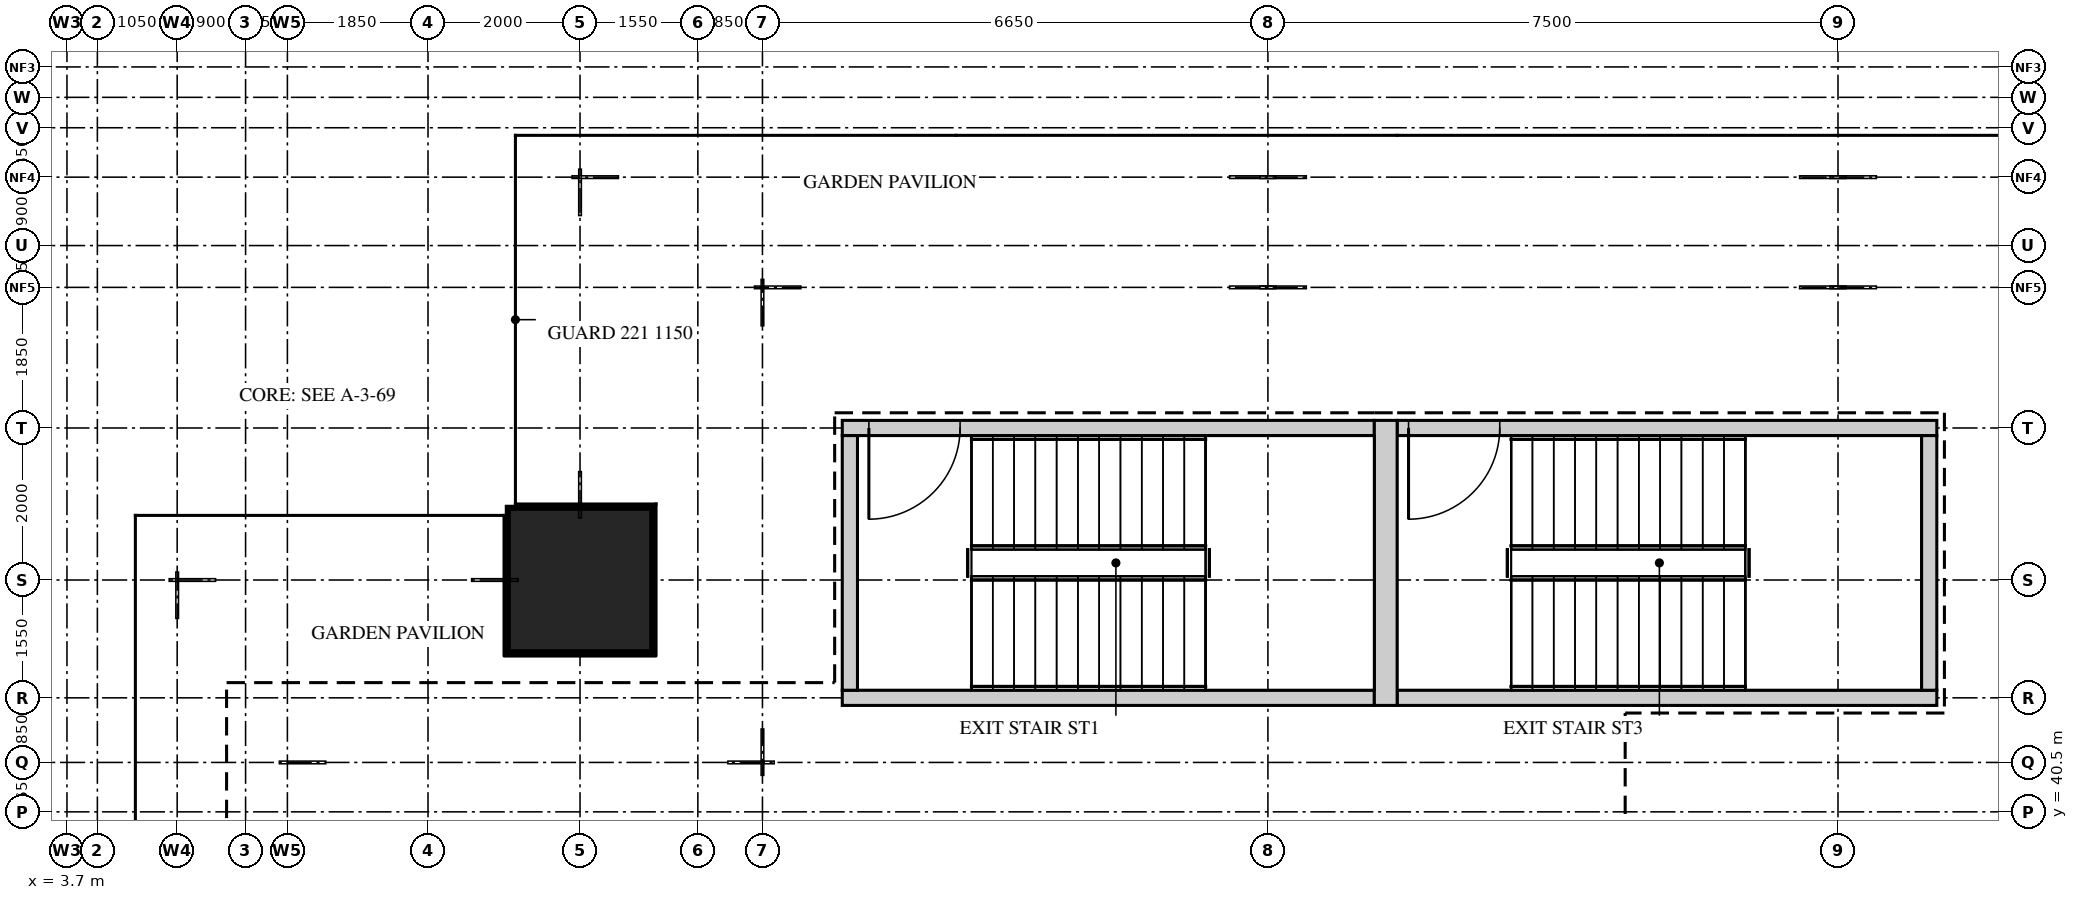
"""IFC4 building model, lengths in metres.
Left out: names, types, materials, properties, quantities, classifications, styles, units other than length and angle.
Written with IfcOpenShell. Run it as: python <this file> out.ifc"""

import sys

from ifc_helpers import new_model, si_unit, direction, frame, frame_2d, origin, origin_2d, place, context, subcontext, project, spatial, rectangle, extrude, source, transform, mapped, element, fill, save


model = new_model("IFC4")
c1 = context("Model", 3, precision=1e-05, world=origin(), true_north=direction((0.0, 1.0)))
c2 = subcontext(c1, "Body", "Model", "MODEL_VIEW")
j1 = project(units=[si_unit("LENGTHUNIT", "METRE"), si_unit("PLANEANGLEUNIT", "RADIAN")], contexts=[c1])
p1 = place(None, origin())
s1 = spatial("IfcSite", under=j1, at=p1, CompositionType="ELEMENT")
p2 = place(p1, origin())
s2 = spatial("IfcBuilding", under=s1, at=p2, CompositionType="ELEMENT")
p3 = place(p2, frame((0.0, 0.0, 274.2)))
s3 = spatial("IfcBuildingStorey", under=s2, at=p3, CompositionType="ELEMENT", Elevation=274.2)
m1 = source(origin(), c2, "Body", "SweptSolid", [
    extrude(rectangle(XDim=7.0, YDim=0.2, at=frame_2d((3.5, 0.0))), origin(), (0.0, 0.0, 1.0), 7.75),
])
p4 = place(p3, frame((13.9, 45.55, 0.0), z_axis=(0.0, 0.0, 1.0), x_axis=(1.0, 0.0, 0.0)))
e1 = element("IfcWall", 1, at=p4, inside=s3, PredefinedType="SHEAR", context=c2, shape_type="MappedRepresentation", body=[
    mapped(m1, transform((0.0, 0.0, 0.0))),
])
m2 = source(origin(), c2, "Body", "SweptSolid", [
    extrude(rectangle(XDim=1.2, YDim=2.1, at=frame_2d((0.6, 1.05))), frame((0.0, 0.11, 0.0), z_axis=(0.0, -1.0, 0.0), x_axis=(1.0, 0.0, 0.0)), (0.0, 0.0, 1.0), 0.22),
])
p5 = place(p4, frame((0.35, 0.0, 0.0)))
e2 = element("IfcOpeningElement", 2, at=p5, cuts=e1, PredefinedType="OPENING", context=c2, shape_type="MappedRepresentation", body=[
    mapped(m2, transform((0.0, 0.0, 0.0))),
])
p6 = place(p3, frame((13.9, 42.0, 0.0), z_axis=(0.0, 0.0, 1.0), x_axis=(1.0, 0.0, 0.0)))
e3 = element("IfcWall", 3, at=p6, inside=s3, PredefinedType="SHEAR", context=c2, shape_type="MappedRepresentation", body=[
    mapped(m1, transform((0.0, 0.0, 0.0))),
])
m3 = source(origin(), c2, "Body", "SweptSolid", [
    extrude(rectangle(XDim=7.1, YDim=0.2, at=frame_2d((3.55, 0.0))), origin(), (0.0, 0.0, 1.0), 7.75),
])
p7 = place(p3, frame((21.2, 45.55, 0.0), z_axis=(0.0, 0.0, 1.0), x_axis=(1.0, 0.0, 0.0)))
e4 = element("IfcWall", 4, at=p7, inside=s3, PredefinedType="SHEAR", context=c2, shape_type="MappedRepresentation", body=[
    mapped(m3, transform((0.0, 0.0, 0.0))),
])
p8 = place(p7, frame((0.15, 0.0, 0.0)))
e5 = element("IfcOpeningElement", 5, at=p8, cuts=e4, PredefinedType="OPENING", context=c2, shape_type="MappedRepresentation", body=[
    mapped(m2, transform((0.0, 0.0, 0.0))),
])
p9 = place(p3, frame((21.2, 42.0, 0.0), z_axis=(0.0, 0.0, 1.0), x_axis=(1.0, 0.0, 0.0)))
e6 = element("IfcWall", 6, at=p9, inside=s3, PredefinedType="SHEAR", context=c2, shape_type="MappedRepresentation", body=[
    mapped(m3, transform((0.0, 0.0, 0.0))),
])
m4 = source(origin(), c2, "Body", "SweptSolid", [
    extrude(rectangle(XDim=3.75, YDim=0.3, at=frame_2d((1.875, 0.0))), origin(), (0.0, 0.0, 1.0), 7.75),
])
p10 = place(p3, frame((21.05, 41.9, 0.0), z_axis=(0.0, 0.0, 1.0), x_axis=(0.0, 1.0, 0.0)))
e7 = element("IfcWall", 7, at=p10, inside=s3, PredefinedType="SHEAR", context=c2, shape_type="MappedRepresentation", body=[
    mapped(m4, transform((0.0, 0.0, 0.0))),
])
m5 = source(origin(), c2, "Body", "SweptSolid", [
    extrude(rectangle(XDim=3.35, YDim=0.2, at=frame_2d((1.675, 0.0))), origin(), (0.0, 0.0, 1.0), 7.75),
])
for number, where, z_axis, x_axis in (
    (8, (14.0, 42.1, 0.0), (0.0, 0.0, 1.0), (0.0, 1.0, 0.0)),
    (9, (28.2, 42.1, 0.0), (0.0, 0.0, 1.0), (0.0, 1.0, 0.0)),
):
    element("IfcWall", number, at=place(p3, frame(where, z_axis=z_axis, x_axis=x_axis)), inside=s3, PredefinedType="SHEAR", context=c2, shape_type="MappedRepresentation", body=[
        mapped(m5, transform((0.0, 0.0, 0.0))),
    ])
m6 = source(origin(), c2, "Body", "SweptSolid", [
    extrude(rectangle(XDim=1.9, YDim=1.9, at=origin_2d()), origin(), (0.0, 0.0, 1.0), 8.0),
])
p11 = place(p3, frame((10.45, 43.55, 0.0), z_axis=(0.0, 0.0, 1.0), x_axis=(1.0, 0.0, 0.0)))
e10 = element("IfcColumn", 10, at=p11, inside=s3, PredefinedType="COLUMN", context=c2, shape_type="MappedRepresentation", body=[
    mapped(m6, transform((0.0, 0.0, 0.0))),
])
m7 = source(origin(), c2, "Body", "SweptSolid", [
    extrude(rectangle(XDim=1.2, YDim=2.1, at=frame_2d((0.6, 1.05))), frame((0.0, 0.025, 0.0), z_axis=(0.0, -1.0, 0.0), x_axis=(1.0, 0.0, 0.0)), (0.0, 0.0, 1.0), 0.05),
])
p12 = place(p5, origin())
e11 = element("IfcDoor", 11, at=p12, inside=s3, OperationType="SINGLE_SWING_LEFT", PredefinedType="DOOR", context=c2, shape_type="MappedRepresentation", body=[
    mapped(m7, transform((0.0, 0.0, 0.0))),
])
fill(e2, e11)
p13 = place(p8, origin())
e12 = element("IfcDoor", 12, at=p13, inside=s3, OperationType="SINGLE_SWING_LEFT", PredefinedType="DOOR", context=c2, shape_type="MappedRepresentation", body=[
    mapped(m7, transform((0.0, 0.0, 0.0))),
])
fill(e5, e12)
save(model, sys.argv[1])
